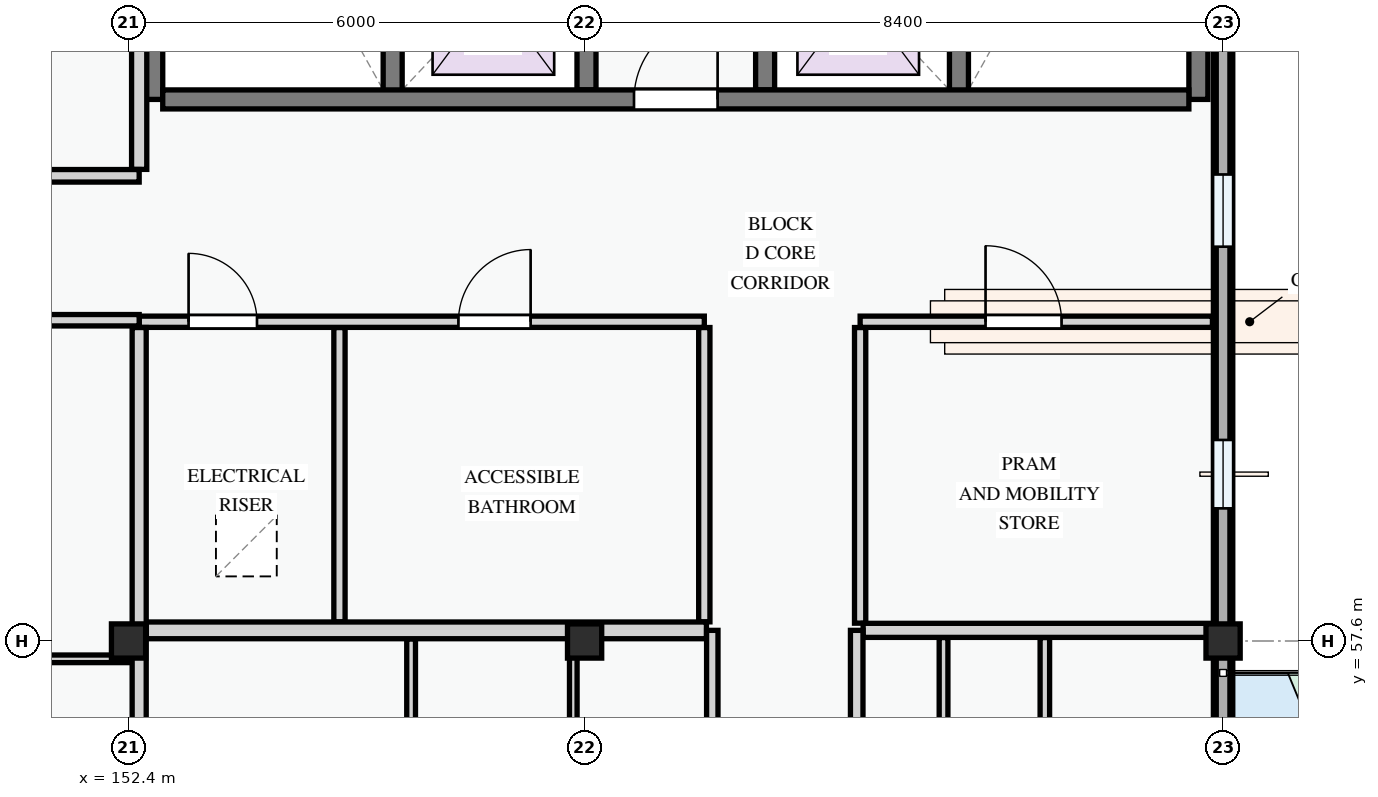
"""IFC4 building model, lengths in metres.
Left out: names, types, materials, properties, quantities, classifications, styles, units other than length and angle.
Written with IfcOpenShell. Run it as: python <this file> out.ifc"""

import sys

from ifc_helpers import new_model, si_unit, direction, frame, frame_2d, origin, origin_2d, place, context, subcontext, project, spatial, polyline, rectangle, outline, extrude, element, fill, save


model = new_model("IFC4")
c1 = context("Model", 3, precision=1e-05, world=origin(), true_north=direction((0.0, 1.0)))
c2 = subcontext(c1, "Body", "Model", "MODEL_VIEW")
j1 = project(units=[si_unit("LENGTHUNIT", "METRE"), si_unit("PLANEANGLEUNIT", "RADIAN")], contexts=[c1])
p1 = place(None, origin())
s1 = spatial("IfcSite", under=j1, at=p1, CompositionType="ELEMENT")
p2 = place(p1, origin())
s2 = spatial("IfcBuilding", under=s1, at=p2, CompositionType="ELEMENT")
p3 = place(p2, frame((0.0, 0.0, 27.9)))
s3 = spatial("IfcBuildingStorey", under=s2, at=p3, CompositionType="ELEMENT", Elevation=27.9)
for number, where, z_axis, x_axis in (
    (1, (152.4, 57.6, 0.0), (0.0, 0.0, 1.0), (1.0, 0.0, 0.0)),
    (2, (158.4, 57.6, 0.0), (0.0, 0.0, 1.0), (1.0, 0.0, 0.0)),
    (3, (166.8, 57.6, 0.0), (0.0, 0.0, 1.0), (1.0, 0.0, 0.0)),
):
    element("IfcColumn", number, at=place(p3, frame(where, z_axis=z_axis, x_axis=x_axis)), inside=s3, PredefinedType="COLUMN", context=c2, shape_type="SweptSolid", body=[
        extrude(rectangle(XDim=0.45, YDim=0.45, at=origin_2d()), origin(), (0.0, 0.0, 1.0), 3.3),
    ])
p4 = place(p3, frame((166.8, 51.6, 0.0), z_axis=(0.0, 0.0, 1.0), x_axis=(0.0, 1.0, 0.0)))
e4 = element("IfcWall", 4, at=p4, inside=s3, PredefinedType="STANDARD", context=c2, shape_type="SweptSolid", body=[
    extrude(rectangle(XDim=6.0, YDim=0.255, at=frame_2d((3.0, 0.0))), origin(), (0.0, 0.0, 1.0), 2.445),
])
p5 = place(p4, frame((0.62, 0.0, 0.0)))
e5 = element("IfcOpeningElement", 5, at=p5, cuts=e4, PredefinedType="OPENING", context=c2, shape_type="SweptSolid", body=[
    extrude(rectangle(XDim=1.25, YDim=2.2, at=frame_2d((0.625, 1.1))), frame((0.0, 0.137, 0.0), z_axis=(0.0, -1.0, 0.0), x_axis=(1.0, 0.0, 0.0)), (0.0, 0.0, 1.0), 0.275),
])
p6 = place(p4, frame((3.025, 0.0, 0.78)))
e6 = element("IfcOpeningElement", 6, at=p6, cuts=e4, PredefinedType="OPENING", context=c2, shape_type="SweptSolid", body=[
    extrude(rectangle(XDim=1.68, YDim=1.46, at=frame_2d((0.84, 0.73))), frame((0.0, 0.137, 0.0), z_axis=(0.0, -1.0, 0.0), x_axis=(1.0, 0.0, 0.0)), (0.0, 0.0, 1.0), 0.275),
])
p7 = place(p3, frame((166.8, 57.6, 0.0), z_axis=(0.0, 0.0, 1.0), x_axis=(0.0, 1.0, 0.0)))
e7 = element("IfcWall", 7, at=p7, inside=s3, PredefinedType="STANDARD", context=c2, shape_type="SweptSolid", body=[
    extrude(rectangle(XDim=8.4, YDim=0.255, at=frame_2d((4.2, 0.0))), origin(), (0.0, 0.0, 1.0), 2.345),
])
p8 = place(p7, frame((1.745, 0.0, 0.78)))
e8 = element("IfcOpeningElement", 8, at=p8, cuts=e7, PredefinedType="OPENING", context=c2, shape_type="SweptSolid", body=[
    extrude(rectangle(XDim=0.9, YDim=1.2, at=frame_2d((0.45, 0.6))), frame((0.0, 0.137, 0.0), z_axis=(0.0, -1.0, 0.0), x_axis=(1.0, 0.0, 0.0)), (0.0, 0.0, 1.0), 0.275),
])
p9 = place(p7, frame((5.188, 0.0, 0.78)))
e9 = element("IfcOpeningElement", 9, at=p9, cuts=e7, PredefinedType="OPENING", context=c2, shape_type="SweptSolid", body=[
    extrude(rectangle(XDim=0.95, YDim=1.15, at=frame_2d((0.475, 0.575))), frame((0.0, 0.137, 0.0), z_axis=(0.0, -1.0, 0.0), x_axis=(1.0, 0.0, 0.0)), (0.0, 0.0, 1.0), 0.275),
])
p10 = place(p3, frame((166.8, 51.6, 3.3), z_axis=(0.0, 0.0, 1.0), x_axis=(0.0, 1.0, 0.0)))
e10 = element("IfcWall", 10, at=p10, inside=s3, PredefinedType="PARAPET", context=c2, shape_type="SweptSolid", body=[
    extrude(outline(polyline([(0.0, 0.0), (6.0, 0.0), (6.0, 1.12), (5.5, 1.322), (5.0, 1.484), (4.5, 1.618), (4.0, 1.718), (3.5, 1.779), (3.0, 1.8), (2.5, 1.779), (2.0, 1.718), (1.5, 1.618), (1.0, 1.484), (0.5, 1.322), (0.0, 1.12), (0.0, 0.0)])), frame((0.0, 0.09, 0.0), z_axis=(0.0, -1.0, 0.0), x_axis=(1.0, 0.0, 0.0)), (0.0, 0.0, 1.0), 0.18),
])
p11 = place(p3, frame((166.8, 57.6, 3.3), z_axis=(0.0, 0.0, 1.0), x_axis=(0.0, 1.0, 0.0)))
e11 = element("IfcWall", 11, at=p11, inside=s3, PredefinedType="PARAPET", context=c2, shape_type="SweptSolid", body=[
    extrude(outline(polyline([(0.0, 0.0), (8.4, 0.0), (8.4, 1.12), (7.7, 1.322), (7.0, 1.484), (6.3, 1.618), (5.6, 1.718), (4.9, 1.779), (4.2, 1.8), (3.5, 1.779), (2.8, 1.718), (2.1, 1.618), (1.4, 1.484), (0.7, 1.322), (0.0, 1.12), (0.0, 0.0)])), frame((0.0, 0.09, 0.0), z_axis=(0.0, -1.0, 0.0), x_axis=(1.0, 0.0, 0.0)), (0.0, 0.0, 1.0), 0.18),
])
p12 = place(p3, frame((155.875, 71.65, 0.0), z_axis=(0.0, 0.0, 1.0), x_axis=(0.0, -1.0, 0.0)))
e12 = element("IfcWall", 12, at=p12, inside=s3, PredefinedType="SHEAR", context=c2, shape_type="SweptSolid", body=[
    extrude(rectangle(XDim=6.925, YDim=0.25, at=frame_2d((3.462, 0.0))), origin(), (0.0, 0.0, 1.0), 3.0),
])
p13 = place(p12, frame((0.35, 0.0, 0.0)))
e13 = element("IfcOpeningElement", 13, at=p13, cuts=e12, PredefinedType="OPENING", context=c2, shape_type="SweptSolid", body=[
    extrude(rectangle(XDim=0.95, YDim=2.1, at=frame_2d((0.475, 1.05))), frame((0.0, 0.135, 0.0), z_axis=(0.0, -1.0, 0.0), x_axis=(1.0, 0.0, 0.0)), (0.0, 0.0, 1.0), 0.27),
])
p14 = place(p3, frame((152.725, 71.8, 0.0), z_axis=(0.0, 0.0, 1.0), x_axis=(0.0, -1.0, 0.0)))
e14 = element("IfcWall", 14, at=p14, inside=s3, PredefinedType="SHEAR", context=c2, shape_type="SweptSolid", body=[
    extrude(rectangle(XDim=7.075, YDim=0.25, at=frame_2d((3.538, 0.0))), origin(), (0.0, 0.0, 1.0), 3.0),
])
p15 = place(p3, frame((166.475, 71.65, 0.0), z_axis=(0.0, 0.0, 1.0), x_axis=(0.0, -1.0, 0.0)))
e15 = element("IfcWall", 15, at=p15, inside=s3, PredefinedType="SHEAR", context=c2, shape_type="SweptSolid", body=[
    extrude(rectangle(XDim=6.925, YDim=0.25, at=frame_2d((3.462, 0.0))), origin(), (0.0, 0.0, 1.0), 3.0),
])
p16 = place(p3, frame((163.325, 71.65, 0.0), z_axis=(0.0, 0.0, 1.0), x_axis=(0.0, -1.0, 0.0)))
e16 = element("IfcWall", 16, at=p16, inside=s3, PredefinedType="SHEAR", context=c2, shape_type="SweptSolid", body=[
    extrude(rectangle(XDim=6.925, YDim=0.25, at=frame_2d((3.462, 0.0))), origin(), (0.0, 0.0, 1.0), 3.0),
])
p17 = place(p16, frame((0.35, 0.0, 0.0)))
e17 = element("IfcOpeningElement", 17, at=p17, cuts=e16, PredefinedType="OPENING", context=c2, shape_type="SweptSolid", body=[
    extrude(rectangle(XDim=0.95, YDim=2.1, at=frame_2d((0.475, 1.05))), frame((0.0, 0.135, 0.0), z_axis=(0.0, -1.0, 0.0), x_axis=(1.0, 0.0, 0.0)), (0.0, 0.0, 1.0), 0.27),
])
for number, where, z_axis, x_axis in (
    (18, (158.425, 67.275, 0.0), (0.0, 0.0, 1.0), (0.0, -1.0, 0.0)),
    (19, (160.775, 67.275, 0.0), (0.0, 0.0, 1.0), (0.0, -1.0, 0.0)),
):
    element("IfcWall", number, at=place(p3, frame(where, z_axis=z_axis, x_axis=x_axis)), inside=s3, PredefinedType="SHEAR", context=c2, shape_type="SweptSolid", body=[
        extrude(rectangle(XDim=2.425, YDim=0.25, at=frame_2d((1.212, 0.0))), origin(), (0.0, 0.0, 1.0), 3.0),
    ])
p18 = place(p3, frame((152.85, 64.725, 0.0), z_axis=(0.0, 0.0, 1.0), x_axis=(1.0, 0.0, 0.0)))
e20 = element("IfcWall", 20, at=p18, inside=s3, PredefinedType="SHEAR", context=c2, shape_type="SweptSolid", body=[
    extrude(rectangle(XDim=13.5, YDim=0.25, at=frame_2d((6.75, 0.0))), origin(), (0.0, 0.0, 1.0), 3.0),
])
p19 = place(p18, frame((6.2, 0.0, 0.0)))
e21 = element("IfcOpeningElement", 21, at=p19, cuts=e20, PredefinedType="OPENING", context=c2, shape_type="SweptSolid", body=[
    extrude(rectangle(XDim=1.1, YDim=2.15, at=frame_2d((0.55, 1.075))), frame((0.0, 0.135, 0.0), z_axis=(0.0, -1.0, 0.0), x_axis=(1.0, 0.0, 0.0)), (0.0, 0.0, 1.0), 0.27),
])
for number, where, z_axis, x_axis in (
    (22, (155.175, 61.724, 0.0), (0.0, 0.0, 1.0), (0.0, -1.0, 0.0)),
    (23, (159.975, 61.724, 0.0), (0.0, 0.0, 1.0), (0.0, -1.0, 0.0)),
):
    element("IfcWall", number, at=place(p3, frame(where, z_axis=z_axis, x_axis=x_axis)), inside=s3, PredefinedType="PARTITIONING", context=c2, shape_type="SweptSolid", body=[
        extrude(rectangle(XDim=3.872, YDim=0.148, at=frame_2d((1.936, 0.0))), origin(), (0.0, 0.0, 1.0), 3.0),
    ])
p20 = place(p3, frame((162.025, 61.724, 0.0), z_axis=(0.0, 0.0, 1.0), x_axis=(0.0, -1.0, 0.0)))
e24 = element("IfcWall", 24, at=p20, inside=s3, PredefinedType="PARTITIONING", context=c2, shape_type="SweptSolid", body=[
    extrude(rectangle(XDim=3.89, YDim=0.148, at=frame_2d((1.945, 0.0))), origin(), (0.0, 0.0, 1.0), 3.0),
])
p21 = place(p3, frame((152.54, 61.8, 0.0), z_axis=(0.0, 0.0, 1.0), x_axis=(1.0, 0.0, 0.0)))
e25 = element("IfcWall", 25, at=p21, inside=s3, PredefinedType="PARTITIONING", context=c2, shape_type="SweptSolid", body=[
    extrude(rectangle(XDim=7.435, YDim=0.148, at=frame_2d((3.718, 0.0))), origin(), (0.0, 0.0, 1.0), 3.0),
])
p22 = place(p21, frame((0.65, 0.0, 0.0)))
e26 = element("IfcOpeningElement", 26, at=p22, cuts=e25, PredefinedType="OPENING", context=c2, shape_type="SweptSolid", body=[
    extrude(rectangle(XDim=0.9, YDim=2.1, at=frame_2d((0.45, 1.05))), frame((0.0, 0.084, 0.0), z_axis=(0.0, -1.0, 0.0), x_axis=(1.0, 0.0, 0.0)), (0.0, 0.0, 1.0), 0.168),
])
p23 = place(p21, frame((4.2, 0.0, 0.0)))
e27 = element("IfcOpeningElement", 27, at=p23, cuts=e25, PredefinedType="OPENING", context=c2, shape_type="SweptSolid", body=[
    extrude(rectangle(XDim=0.95, YDim=2.1, at=frame_2d((0.475, 1.05))), frame((0.0, 0.084, 0.0), z_axis=(0.0, -1.0, 0.0), x_axis=(1.0, 0.0, 0.0)), (0.0, 0.0, 1.0), 0.168),
])
p24 = place(p3, frame((162.025, 61.8, 0.0), z_axis=(0.0, 0.0, 1.0), x_axis=(1.0, 0.0, 0.0)))
e28 = element("IfcWall", 28, at=p24, inside=s3, PredefinedType="PARTITIONING", context=c2, shape_type="SweptSolid", body=[
    extrude(rectangle(XDim=4.635, YDim=0.148, at=frame_2d((2.317, 0.0))), origin(), (0.0, 0.0, 1.0), 3.0),
])
p25 = place(p24, frame((1.65, 0.0, 0.0)))
e29 = element("IfcOpeningElement", 29, at=p25, cuts=e28, PredefinedType="OPENING", context=c2, shape_type="SweptSolid", body=[
    extrude(rectangle(XDim=1.0, YDim=2.15, at=frame_2d((0.5, 1.075))), frame((0.0, 0.084, 0.0), z_axis=(0.0, -1.0, 0.0), x_axis=(1.0, 0.0, 0.0)), (0.0, 0.0, 1.0), 0.168),
])
p26 = place(p3, frame((156.118, 49.854, 0.0), z_axis=(0.0, 0.0, 1.0), x_axis=(0.0, 1.0, 0.0)))
e30 = element("IfcWall", 30, at=p26, inside=s3, PredefinedType="PARTITIONING", context=c2, shape_type="SweptSolid", body=[
    extrude(rectangle(XDim=7.773, YDim=0.115, at=frame_2d((3.887, 0.0))), origin(), (0.0, 0.0, 1.0), 3.0),
])
p27 = place(p3, frame((158.251, 49.854, 0.0), z_axis=(0.0, 0.0, 1.0), x_axis=(0.0, 1.0, 0.0)))
e31 = element("IfcWall", 31, at=p27, inside=s3, PredefinedType="PARTITIONING", context=c2, shape_type="SweptSolid", body=[
    extrude(rectangle(XDim=7.773, YDim=0.1, at=frame_2d((3.887, 0.0))), origin(), (0.0, 0.0, 1.0), 2.425),
])
p28 = place(p3, frame((164.455, 49.908, 0.0), z_axis=(0.0, 0.0, 1.0), x_axis=(0.0, 1.0, 0.0)))
e32 = element("IfcWall", 32, at=p28, inside=s3, PredefinedType="PARTITIONING", context=c2, shape_type="SweptSolid", body=[
    extrude(rectangle(XDim=7.738, YDim=0.125, at=frame_2d((3.869, 0.0))), origin(), (0.0, 0.0, 1.0), 3.0),
])
p29 = place(p3, frame((163.122, 49.908, 0.0), z_axis=(0.0, 0.0, 1.0), x_axis=(0.0, 1.0, 0.0)))
e33 = element("IfcWall", 33, at=p29, inside=s3, PredefinedType="PARTITIONING", context=c2, shape_type="SweptSolid", body=[
    extrude(rectangle(XDim=7.738, YDim=0.115, at=frame_2d((3.869, 0.0))), origin(), (0.0, 0.0, 1.0), 3.0),
])
p30 = place(p3, frame((152.635, 57.74, 0.0), z_axis=(0.0, 0.0, 1.0), x_axis=(1.0, 0.0, 0.0)))
e34 = element("IfcWall", 34, at=p30, inside=s3, PredefinedType="PARTITIONING", context=c2, shape_type="SweptSolid", body=[
    extrude(rectangle(XDim=7.368, YDim=0.22, at=frame_2d((3.684, 0.0))), origin(), (0.0, 0.0, 1.0), 2.375),
])
p31 = place(p3, frame((162.064, 57.74, 0.0), z_axis=(0.0, 0.0, 1.0), x_axis=(1.0, 0.0, 0.0)))
e35 = element("IfcWall", 35, at=p31, inside=s3, PredefinedType="PARTITIONING", context=c2, shape_type="SweptSolid", body=[
    extrude(rectangle(XDim=4.606, YDim=0.185, at=frame_2d((2.303, 0.0))), origin(), (0.0, 0.0, 1.0), 2.375),
])
p32 = place(p3, frame((160.08, 37.33, 0.0), z_axis=(0.0, 0.0, 1.0), x_axis=(0.0, 1.0, 0.0)))
e36 = element("IfcWall", 36, at=p32, inside=s3, PredefinedType="PARTITIONING", context=c2, shape_type="SweptSolid", body=[
    extrude(rectangle(XDim=20.41, YDim=0.15, at=frame_2d((10.205, 0.0))), origin(), (0.0, 0.0, 1.0), 3.0),
])
p33 = place(p32, frame((2.383, 0.0, 0.0)))
e37 = element("IfcOpeningElement", 37, at=p33, cuts=e36, PredefinedType="OPENING", context=c2, shape_type="SweptSolid", body=[
    extrude(rectangle(XDim=0.96, YDim=2.12, at=frame_2d((0.48, 1.06))), frame((0.0, 0.085, 0.0), z_axis=(0.0, -1.0, 0.0), x_axis=(1.0, 0.0, 0.0)), (0.0, 0.0, 1.0), 0.17),
])
p34 = place(p32, frame((9.605, 0.0, 0.0)))
e38 = element("IfcOpeningElement", 38, at=p34, cuts=e36, PredefinedType="OPENING", context=c2, shape_type="SweptSolid", body=[
    extrude(rectangle(XDim=0.92, YDim=2.1, at=frame_2d((0.46, 1.05))), frame((0.0, 0.085, 0.0), z_axis=(0.0, -1.0, 0.0), x_axis=(1.0, 0.0, 0.0)), (0.0, 0.0, 1.0), 0.17),
])
p35 = place(p3, frame((161.98, 37.33, 0.0), z_axis=(0.0, 0.0, 1.0), x_axis=(0.0, 1.0, 0.0)))
e39 = element("IfcWall", 39, at=p35, inside=s3, PredefinedType="PARTITIONING", context=c2, shape_type="SweptSolid", body=[
    extrude(rectangle(XDim=20.41, YDim=0.165, at=frame_2d((10.205, 0.0))), origin(), (0.0, 0.0, 1.0), 3.0),
])
p36 = place(p35, frame((2.384, 0.0, 0.0)))
e40 = element("IfcOpeningElement", 40, at=p36, cuts=e39, PredefinedType="OPENING", context=c2, shape_type="SweptSolid", body=[
    extrude(rectangle(XDim=0.92, YDim=2.1, at=frame_2d((0.46, 1.05))), frame((0.0, 0.093, 0.0), z_axis=(0.0, -1.0, 0.0), x_axis=(1.0, 0.0, 0.0)), (0.0, 0.0, 1.0), 0.185),
])
p37 = place(p35, frame((9.628, 0.0, 0.0)))
e41 = element("IfcOpeningElement", 41, at=p37, cuts=e39, PredefinedType="OPENING", context=c2, shape_type="SweptSolid", body=[
    extrude(rectangle(XDim=0.92, YDim=2.1, at=frame_2d((0.46, 1.05))), frame((0.0, 0.093, 0.0), z_axis=(0.0, -1.0, 0.0), x_axis=(1.0, 0.0, 0.0)), (0.0, 0.0, 1.0), 0.185),
])
p38 = place(p3, frame((145.865, 57.365, 0.0), z_axis=(0.0, 0.0, 1.0), x_axis=(1.0, 0.0, 0.0)))
e42 = element("IfcWall", 42, at=p38, inside=s3, PredefinedType="PARTITIONING", context=c2, shape_type="SweptSolid", body=[
    extrude(rectangle(XDim=6.581, YDim=0.1, at=frame_2d((3.291, 0.0))), origin(), (0.0, 0.0, 1.0), 2.375),
])
p39 = place(p3, frame((152.54, 43.26, 0.0), z_axis=(0.0, 0.0, 1.0), x_axis=(0.0, 1.0, 0.0)))
e43 = element("IfcWall", 43, at=p39, inside=s3, PredefinedType="PARTITIONING", context=c2, shape_type="SweptSolid", body=[
    extrude(rectangle(XDim=18.464, YDim=0.185, at=frame_2d((9.232, 0.0))), origin(), (0.0, 0.0, 1.0), 2.425),
])
p40 = place(p3, frame((152.54, 63.804, 0.0), z_axis=(0.0, 0.0, 1.0), x_axis=(0.0, 1.0, 0.0)))
e44 = element("IfcWall", 44, at=p40, inside=s3, PredefinedType="PARTITIONING", context=c2, shape_type="SweptSolid", body=[
    extrude(rectangle(XDim=8.066, YDim=0.2, at=frame_2d((4.033, 0.0))), origin(), (0.0, 0.0, 1.0), 2.425),
])
p41 = place(p3, frame((138.129, 61.82, 0.0), z_axis=(0.0, 0.0, 1.0), x_axis=(1.0, 0.0, 0.0)))
e45 = element("IfcWall", 45, at=p41, inside=s3, PredefinedType="PARTITIONING", context=c2, shape_type="SweptSolid", body=[
    extrude(rectangle(XDim=14.411, YDim=0.15, at=frame_2d((7.205, 0.0))), origin(), (0.0, 0.0, 1.0), 3.0),
])
p42 = place(p41, frame((2.339, 0.0, 0.0)))
e46 = element("IfcOpeningElement", 46, at=p42, cuts=e45, PredefinedType="OPENING", context=c2, shape_type="SweptSolid", body=[
    extrude(rectangle(XDim=0.96, YDim=2.12, at=frame_2d((0.48, 1.06))), frame((0.0, 0.085, 0.0), z_axis=(0.0, -1.0, 0.0), x_axis=(1.0, 0.0, 0.0)), (0.0, 0.0, 1.0), 0.17),
])
p43 = place(p3, frame((138.129, 63.72, 0.0), z_axis=(0.0, 0.0, 1.0), x_axis=(1.0, 0.0, 0.0)))
e47 = element("IfcWall", 47, at=p43, inside=s3, PredefinedType="PARTITIONING", context=c2, shape_type="SweptSolid", body=[
    extrude(rectangle(XDim=14.411, YDim=0.165, at=frame_2d((7.205, 0.0))), origin(), (0.0, 0.0, 1.0), 3.0),
])
p44 = place(p43, frame((2.343, 0.0, 0.0)))
e48 = element("IfcOpeningElement", 48, at=p44, cuts=e47, PredefinedType="OPENING", context=c2, shape_type="SweptSolid", body=[
    extrude(rectangle(XDim=0.92, YDim=2.1, at=frame_2d((0.46, 1.05))), frame((0.0, 0.093, 0.0), z_axis=(0.0, -1.0, 0.0), x_axis=(1.0, 0.0, 0.0)), (0.0, 0.0, 1.0), 0.185),
])
p45 = place(p8, origin())
e49 = element("IfcWindow", 49, at=p45, inside=s3, PartitioningType="SINGLE_PANEL", PredefinedType="WINDOW", context=c2, shape_type="SweptSolid", body=[
    extrude(rectangle(XDim=0.9, YDim=1.2, at=frame_2d((0.45, 0.6))), frame((0.0, 0.03, 0.0), z_axis=(0.0, -1.0, 0.0), x_axis=(1.0, 0.0, 0.0)), (0.0, 0.0, 1.0), 0.06),
])
fill(e8, e49)
p46 = place(p9, origin())
e50 = element("IfcWindow", 50, at=p46, inside=s3, PartitioningType="SINGLE_PANEL", PredefinedType="WINDOW", context=c2, shape_type="SweptSolid", body=[
    extrude(rectangle(XDim=0.95, YDim=1.15, at=frame_2d((0.475, 0.575))), frame((0.0, 0.03, 0.0), z_axis=(0.0, -1.0, 0.0), x_axis=(1.0, 0.0, 0.0)), (0.0, 0.0, 1.0), 0.06),
])
fill(e9, e50)
p47 = place(p19, origin())
e51 = element("IfcDoor", 51, at=p47, inside=s3, OperationType="SINGLE_SWING_RIGHT", PredefinedType="DOOR", context=c2, shape_type="SweptSolid", body=[
    extrude(rectangle(XDim=1.1, YDim=2.15, at=frame_2d((0.55, 1.075))), frame((0.0, 0.025, 0.0), z_axis=(0.0, -1.0, 0.0), x_axis=(1.0, 0.0, 0.0)), (0.0, 0.0, 1.0), 0.05),
])
fill(e21, e51)
p48 = place(p22, origin())
e52 = element("IfcDoor", 52, at=p48, inside=s3, OperationType="SINGLE_SWING_LEFT", PredefinedType="DOOR", context=c2, shape_type="SweptSolid", body=[
    extrude(rectangle(XDim=0.9, YDim=2.1, at=frame_2d((0.45, 1.05))), frame((0.0, 0.025, 0.0), z_axis=(0.0, -1.0, 0.0), x_axis=(1.0, 0.0, 0.0)), (0.0, 0.0, 1.0), 0.05),
])
fill(e26, e52)
p49 = place(p23, origin())
e53 = element("IfcDoor", 53, at=p49, inside=s3, OperationType="SINGLE_SWING_RIGHT", PredefinedType="DOOR", context=c2, shape_type="SweptSolid", body=[
    extrude(rectangle(XDim=0.95, YDim=2.1, at=frame_2d((0.475, 1.05))), frame((0.0, 0.025, 0.0), z_axis=(0.0, -1.0, 0.0), x_axis=(1.0, 0.0, 0.0)), (0.0, 0.0, 1.0), 0.05),
])
fill(e27, e53)
p50 = place(p25, origin())
e54 = element("IfcDoor", 54, at=p50, inside=s3, OperationType="SINGLE_SWING_LEFT", PredefinedType="DOOR", context=c2, shape_type="SweptSolid", body=[
    extrude(rectangle(XDim=1.0, YDim=2.15, at=frame_2d((0.5, 1.075))), frame((0.0, 0.025, 0.0), z_axis=(0.0, -1.0, 0.0), x_axis=(1.0, 0.0, 0.0)), (0.0, 0.0, 1.0), 0.05),
])
fill(e29, e54)
save(model, sys.argv[1])
